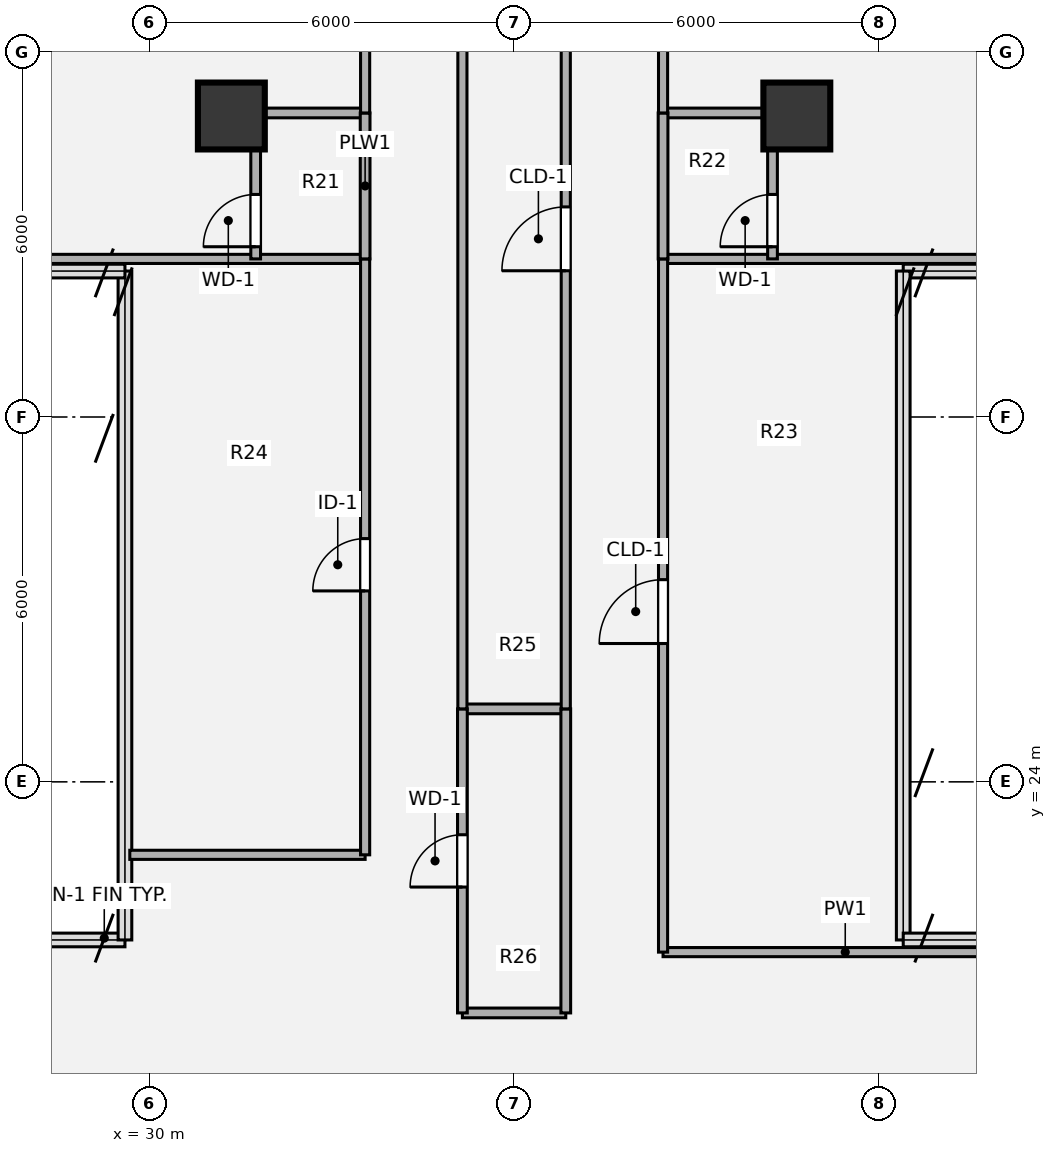
"""IFC4 building model, lengths in metres.
Left out: names, types, materials, properties, quantities, classifications, styles, units other than length and angle.
Written with IfcOpenShell. Run it as: python <this file> out.ifc"""

import sys

from ifc_helpers import new_model, si_unit, direction, frame, frame_2d, origin, origin_2d, place, context, subcontext, project, spatial, rectangle, hollow_circle, extrude, source, transform, mapped, element, fill, save


model = new_model("IFC4")
c1 = context("Model", 3, precision=1e-05, world=origin(), true_north=direction((0.0, 1.0)))
c2 = subcontext(c1, "Body", "Model", "MODEL_VIEW")
j1 = project(units=[si_unit("LENGTHUNIT", "METRE"), si_unit("PLANEANGLEUNIT", "RADIAN")], contexts=[c1])
p1 = place(None, origin())
s1 = spatial("IfcSite", under=j1, at=p1, CompositionType="ELEMENT")
p2 = place(p1, origin())
s2 = spatial("IfcBuilding", under=s1, at=p2, CompositionType="ELEMENT")
p3 = place(p2, frame((0.0, 0.0, 205.56)))
s3 = spatial("IfcBuildingStorey", under=s2, at=p3, CompositionType="ELEMENT", Elevation=205.56)
m1 = source(origin(), c2, "Body", "SweptSolid", [
    extrude(hollow_circle(Radius=0.55, WallThickness=0.04, at=origin_2d()), origin(), (0.0, 0.0, 1.0), 3.78),
])
for number, where, z_axis, x_axis in (
    (1, (31.35, 34.95, 0.0), (0.0, 0.0, 1.0), (1.0, 0.0, 0.0)),
    (2, (40.65, 34.95, 0.0), (0.0, 0.0, 1.0), (1.0, 0.0, 0.0)),
):
    element("IfcColumn", number, at=place(p3, frame(where, z_axis=z_axis, x_axis=x_axis)), inside=s3, PredefinedType="COLUMN", context=c2, shape_type="MappedRepresentation", body=[
        mapped(m1, transform((0.0, 0.0, 0.0), x_axis=(1.0, 0.0, 0.0), y_axis=(0.0, 1.0, 0.0), z_axis=(0.0, 0.0, 1.0), scale=1.0)),
    ])
p4 = place(p3, frame((35.15, 20.2, 0.0), z_axis=(0.0, 0.0, 1.0), x_axis=(1.0, 0.0, 0.0)))
e3 = element("IfcWall", 3, at=p4, inside=s3, PredefinedType="PLUMBINGWALL", context=c2, shape_type="SweptSolid", body=[
    extrude(rectangle(XDim=1.7, YDim=0.16, at=frame_2d((0.85, 0.0))), origin(), (0.0, 0.0, 1.0), 3.5),
])
p5 = place(p3, frame((38.45, 21.2, 0.0), z_axis=(0.0, 0.0, 1.0), x_axis=(1.0, 0.0, 0.0)))
e4 = element("IfcWall", 4, at=p5, inside=s3, PredefinedType="PARTITIONING", context=c2, shape_type="SweptSolid", body=[
    extrude(rectangle(XDim=5.993, YDim=0.15, at=frame_2d((2.996, 0.0))), origin(), (0.0, 0.0, 1.0), 3.5),
])
p6 = place(p3, frame((29.68, 22.8, 0.0), z_axis=(0.0, 0.0, 1.0), x_axis=(1.0, 0.0, 0.0)))
e5 = element("IfcWall", 5, at=p6, inside=s3, PredefinedType="PARTITIONING", context=c2, shape_type="SweptSolid", body=[
    extrude(rectangle(XDim=3.87, YDim=0.15, at=frame_2d((1.935, 0.0))), origin(), (0.0, 0.0, 1.0), 3.5),
])
p7 = place(p3, frame((35.15, 25.2, 0.0), z_axis=(0.0, 0.0, 1.0), x_axis=(1.0, 0.0, 0.0)))
e6 = element("IfcWall", 6, at=p7, inside=s3, PredefinedType="PLUMBINGWALL", context=c2, shape_type="SweptSolid", body=[
    extrude(rectangle(XDim=1.7, YDim=0.16, at=frame_2d((0.85, 0.0))), origin(), (0.0, 0.0, 1.0), 3.5),
])
p8 = place(p3, frame((27.557, 32.6, 0.0), z_axis=(0.0, 0.0, 1.0), x_axis=(1.0, 0.0, 0.0)))
e7 = element("IfcWall", 7, at=p8, inside=s3, PredefinedType="PARTITIONING", context=c2, shape_type="SweptSolid", body=[
    extrude(rectangle(XDim=5.993, YDim=0.15, at=frame_2d((2.997, 0.0))), origin(), (0.0, 0.0, 1.0), 3.5),
])
p9 = place(p3, frame((38.45, 32.6, 0.0), z_axis=(0.0, 0.0, 1.0), x_axis=(1.0, 0.0, 0.0)))
e8 = element("IfcWall", 8, at=p9, inside=s3, PredefinedType="PARTITIONING", context=c2, shape_type="SweptSolid", body=[
    extrude(rectangle(XDim=5.993, YDim=0.15, at=frame_2d((2.997, 0.0))), origin(), (0.0, 0.0, 1.0), 3.5),
])
for number, where, z_axis, x_axis in (
    (9, (31.75, 35.0, 0.0), (0.0, 0.0, 1.0), (1.0, 0.0, 0.0)),
    (10, (38.45, 35.0, 0.0), (0.0, 0.0, 1.0), (1.0, 0.0, 0.0)),
):
    element("IfcWall", number, at=place(p3, frame(where, z_axis=z_axis, x_axis=x_axis)), inside=s3, PredefinedType="PLUMBINGWALL", context=c2, shape_type="SweptSolid", body=[
        extrude(rectangle(XDim=1.8, YDim=0.16, at=frame_2d((0.9, 0.0))), origin(), (0.0, 0.0, 1.0), 2.903),
    ])
p10 = place(p3, frame((31.75, 32.6, 0.0), z_axis=(0.0, 0.0, 1.0), x_axis=(0.0, 1.0, 0.0)))
e11 = element("IfcWall", 11, at=p10, inside=s3, PredefinedType="PLUMBINGWALL", context=c2, shape_type="SweptSolid", body=[
    extrude(rectangle(XDim=2.4, YDim=0.16, at=frame_2d((1.2, 0.0))), origin(), (0.0, 0.0, 1.0), 3.5),
])
p11 = place(p10, frame((0.2, 0.0, 0.0)))
e12 = element("IfcOpeningElement", 12, at=p11, cuts=e11, PredefinedType="OPENING", context=c2, shape_type="SweptSolid", body=[
    extrude(rectangle(XDim=0.86, YDim=2.1, at=origin_2d()), frame((0.43, 0.09, 1.05), z_axis=(0.0, -1.0, 0.0), x_axis=(1.0, 0.0, 0.0)), (0.0, 0.0, 1.0), 0.18),
])
p12 = place(p3, frame((33.55, 22.8, 0.0), z_axis=(0.0, 0.0, 1.0), x_axis=(0.0, 1.0, 0.0)))
e13 = element("IfcWall", 13, at=p12, inside=s3, PredefinedType="PARTITIONING", context=c2, shape_type="SweptSolid", body=[
    extrude(rectangle(XDim=9.8, YDim=0.15, at=frame_2d((4.9, 0.0))), origin(), (0.0, 0.0, 1.0), 3.5),
])
p13 = place(p12, frame((4.34, 0.0, 0.0)))
e14 = element("IfcOpeningElement", 14, at=p13, cuts=e13, PredefinedType="OPENING", context=c2, shape_type="SweptSolid", body=[
    extrude(rectangle(XDim=0.86, YDim=2.1, at=origin_2d()), frame((0.43, 0.085, 1.05), z_axis=(0.0, -1.0, 0.0), x_axis=(1.0, 0.0, 0.0)), (0.0, 0.0, 1.0), 0.17),
])
p14 = place(p3, frame((33.55, 32.6, 0.0), z_axis=(0.0, 0.0, 1.0), x_axis=(0.0, 1.0, 0.0)))
e15 = element("IfcWall", 15, at=p14, inside=s3, PredefinedType="PLUMBINGWALL", context=c2, shape_type="SweptSolid", body=[
    extrude(rectangle(XDim=2.4, YDim=0.16, at=frame_2d((1.2, 0.0))), origin(), (0.0, 0.0, 1.0), 3.5),
])
p15 = place(p3, frame((33.55, 35.0, 0.0), z_axis=(0.0, 0.0, 1.0), x_axis=(0.0, 1.0, 0.0)))
e16 = element("IfcWall", 16, at=p15, inside=s3, PredefinedType="PARTITIONING", context=c2, shape_type="SweptSolid", body=[
    extrude(rectangle(XDim=3.526, YDim=0.15, at=frame_2d((1.763, 0.0))), origin(), (0.0, 0.0, 1.0), 3.5),
])
p16 = place(p15, frame((1.303, 0.0, 0.0)))
e17 = element("IfcOpeningElement", 17, at=p16, cuts=e16, PredefinedType="OPENING", context=c2, shape_type="SweptSolid", body=[
    extrude(rectangle(XDim=0.92, YDim=2.1, at=origin_2d()), frame((0.46, 0.085, 1.05), z_axis=(0.0, -1.0, 0.0), x_axis=(1.0, 0.0, 0.0)), (0.0, 0.0, 1.0), 0.17),
])
p17 = place(p3, frame((35.15, 20.2, 0.0), z_axis=(0.0, 0.0, 1.0), x_axis=(0.0, 1.0, 0.0)))
e18 = element("IfcWall", 18, at=p17, inside=s3, PredefinedType="PLUMBINGWALL", context=c2, shape_type="SweptSolid", body=[
    extrude(rectangle(XDim=5.0, YDim=0.16, at=frame_2d((2.5, 0.0))), origin(), (0.0, 0.0, 1.0), 3.5),
])
p18 = place(p17, frame((2.07, 0.0, 0.0)))
e19 = element("IfcOpeningElement", 19, at=p18, cuts=e18, PredefinedType="OPENING", context=c2, shape_type="SweptSolid", body=[
    extrude(rectangle(XDim=0.86, YDim=2.1, at=origin_2d()), frame((0.43, 0.09, 1.05), z_axis=(0.0, -1.0, 0.0), x_axis=(1.0, 0.0, 0.0)), (0.0, 0.0, 1.0), 0.18),
])
p19 = place(p3, frame((35.15, 25.2, 0.0), z_axis=(0.0, 0.0, 1.0), x_axis=(0.0, 1.0, 0.0)))
e20 = element("IfcWall", 20, at=p19, inside=s3, PredefinedType="PARTITIONING", context=c2, shape_type="SweptSolid", body=[
    extrude(rectangle(XDim=15.46, YDim=0.15, at=frame_2d((7.73, 0.0))), origin(), (0.0, 0.0, 1.0), 3.5),
])
p20 = place(p3, frame((36.85, 20.2, 0.0), z_axis=(0.0, 0.0, 1.0), x_axis=(0.0, 1.0, 0.0)))
e21 = element("IfcWall", 21, at=p20, inside=s3, PredefinedType="PLUMBINGWALL", context=c2, shape_type="SweptSolid", body=[
    extrude(rectangle(XDim=5.0, YDim=0.16, at=frame_2d((2.5, 0.0))), origin(), (0.0, 0.0, 1.0), 3.5),
])
p21 = place(p3, frame((36.85, 25.2, 0.0), z_axis=(0.0, 0.0, 1.0), x_axis=(0.0, 1.0, 0.0)))
e22 = element("IfcWall", 22, at=p21, inside=s3, PredefinedType="PARTITIONING", context=c2, shape_type="SweptSolid", body=[
    extrude(rectangle(XDim=15.46, YDim=0.15, at=frame_2d((7.73, 0.0))), origin(), (0.0, 0.0, 1.0), 3.5),
])
p22 = place(p21, frame((7.205, 0.0, 0.0)))
e23 = element("IfcOpeningElement", 23, at=p22, cuts=e22, PredefinedType="OPENING", context=c2, shape_type="SweptSolid", body=[
    extrude(rectangle(XDim=1.05, YDim=2.1, at=origin_2d()), frame((0.525, 0.085, 1.05), z_axis=(0.0, -1.0, 0.0), x_axis=(1.0, 0.0, 0.0)), (0.0, 0.0, 1.0), 0.17),
])
p23 = place(p3, frame((38.45, 21.2, 0.0), z_axis=(0.0, 0.0, 1.0), x_axis=(0.0, 1.0, 0.0)))
e24 = element("IfcWall", 24, at=p23, inside=s3, PredefinedType="PARTITIONING", context=c2, shape_type="SweptSolid", body=[
    extrude(rectangle(XDim=11.4, YDim=0.15, at=frame_2d((5.7, 0.0))), origin(), (0.0, 0.0, 1.0), 3.5),
])
p24 = place(p23, frame((5.075, 0.0, 0.0)))
e25 = element("IfcOpeningElement", 25, at=p24, cuts=e24, PredefinedType="OPENING", context=c2, shape_type="SweptSolid", body=[
    extrude(rectangle(XDim=1.05, YDim=2.1, at=origin_2d()), frame((0.525, 0.085, 1.05), z_axis=(0.0, -1.0, 0.0), x_axis=(1.0, 0.0, 0.0)), (0.0, 0.0, 1.0), 0.17),
])
p25 = place(p3, frame((38.45, 32.6, 0.0), z_axis=(0.0, 0.0, 1.0), x_axis=(0.0, 1.0, 0.0)))
e26 = element("IfcWall", 26, at=p25, inside=s3, PredefinedType="PLUMBINGWALL", context=c2, shape_type="SweptSolid", body=[
    extrude(rectangle(XDim=2.4, YDim=0.16, at=frame_2d((1.2, 0.0))), origin(), (0.0, 0.0, 1.0), 3.5),
])
p26 = place(p3, frame((38.45, 35.0, 0.0), z_axis=(0.0, 0.0, 1.0), x_axis=(0.0, 1.0, 0.0)))
e27 = element("IfcWall", 27, at=p26, inside=s3, PredefinedType="PARTITIONING", context=c2, shape_type="SweptSolid", body=[
    extrude(rectangle(XDim=3.526, YDim=0.15, at=frame_2d((1.763, 0.0))), origin(), (0.0, 0.0, 1.0), 3.5),
])
p27 = place(p26, frame((1.303, 0.0, 0.0)))
e28 = element("IfcOpeningElement", 28, at=p27, cuts=e27, PredefinedType="OPENING", context=c2, shape_type="SweptSolid", body=[
    extrude(rectangle(XDim=0.92, YDim=2.1, at=origin_2d()), frame((0.46, 0.085, 1.05), z_axis=(0.0, -1.0, 0.0), x_axis=(1.0, 0.0, 0.0)), (0.0, 0.0, 1.0), 0.17),
])
p28 = place(p3, frame((40.25, 32.6, 0.0), z_axis=(0.0, 0.0, 1.0), x_axis=(0.0, 1.0, 0.0)))
e29 = element("IfcWall", 29, at=p28, inside=s3, PredefinedType="PLUMBINGWALL", context=c2, shape_type="SweptSolid", body=[
    extrude(rectangle(XDim=2.4, YDim=0.16, at=frame_2d((1.2, 0.0))), origin(), (0.0, 0.0, 1.0), 3.5),
])
p29 = place(p28, frame((0.2, 0.0, 0.0)))
e30 = element("IfcOpeningElement", 30, at=p29, cuts=e29, PredefinedType="OPENING", context=c2, shape_type="SweptSolid", body=[
    extrude(rectangle(XDim=0.86, YDim=2.1, at=origin_2d()), frame((0.43, 0.09, 1.05), z_axis=(0.0, -1.0, 0.0), x_axis=(1.0, 0.0, 0.0)), (0.0, 0.0, 1.0), 0.18),
])
m2 = source(origin(), c2, "Body", "SweptSolid", [
    extrude(rectangle(XDim=0.86, YDim=2.1, at=origin_2d()), frame((0.43, 0.025, 1.05), z_axis=(0.0, -1.0, 0.0), x_axis=(1.0, 0.0, 0.0)), (0.0, 0.0, 1.0), 0.05),
])
p30 = place(p11, origin())
e31 = element("IfcDoor", 31, at=p30, inside=s3, OperationType="SINGLE_SWING_LEFT", PredefinedType="DOOR", context=c2, shape_type="MappedRepresentation", body=[
    mapped(m2, transform((0.0, 0.0, 0.0), x_axis=(1.0, 0.0, 0.0), y_axis=(0.0, 1.0, 0.0), z_axis=(0.0, 0.0, 1.0), scale=1.0)),
])
fill(e12, e31)
m3 = source(origin(), c2, "Body", "SweptSolid", [
    extrude(rectangle(XDim=0.86, YDim=2.1, at=origin_2d()), frame((0.43, 0.025, 1.05), z_axis=(0.0, -1.0, 0.0), x_axis=(1.0, 0.0, 0.0)), (0.0, 0.0, 1.0), 0.05),
])
p31 = place(p13, origin())
e32 = element("IfcDoor", 32, at=p31, inside=s3, OperationType="SINGLE_SWING_LEFT", PredefinedType="DOOR", context=c2, shape_type="MappedRepresentation", body=[
    mapped(m3, transform((0.0, 0.0, 0.0), x_axis=(1.0, 0.0, 0.0), y_axis=(0.0, 1.0, 0.0), z_axis=(0.0, 0.0, 1.0), scale=1.0)),
])
fill(e14, e32)
p32 = place(p18, origin())
e33 = element("IfcDoor", 33, at=p32, inside=s3, OperationType="SINGLE_SWING_LEFT", PredefinedType="DOOR", context=c2, shape_type="MappedRepresentation", body=[
    mapped(m2, transform((0.0, 0.0, 0.0), x_axis=(1.0, 0.0, 0.0), y_axis=(0.0, 1.0, 0.0), z_axis=(0.0, 0.0, 1.0), scale=1.0)),
])
fill(e19, e33)
m4 = source(origin(), c2, "Body", "SweptSolid", [
    extrude(rectangle(XDim=1.05, YDim=2.1, at=origin_2d()), frame((0.525, 0.025, 1.05), z_axis=(0.0, -1.0, 0.0), x_axis=(1.0, 0.0, 0.0)), (0.0, 0.0, 1.0), 0.05),
])
p33 = place(p22, origin())
e34 = element("IfcDoor", 34, at=p33, inside=s3, OperationType="SINGLE_SWING_LEFT", PredefinedType="DOOR", context=c2, shape_type="MappedRepresentation", body=[
    mapped(m4, transform((0.0, 0.0, 0.0), x_axis=(1.0, 0.0, 0.0), y_axis=(0.0, 1.0, 0.0), z_axis=(0.0, 0.0, 1.0), scale=1.0)),
])
fill(e23, e34)
p34 = place(p24, origin())
e35 = element("IfcDoor", 35, at=p34, inside=s3, OperationType="SINGLE_SWING_LEFT", PredefinedType="DOOR", context=c2, shape_type="MappedRepresentation", body=[
    mapped(m4, transform((0.0, 0.0, 0.0), x_axis=(1.0, 0.0, 0.0), y_axis=(0.0, 1.0, 0.0), z_axis=(0.0, 0.0, 1.0), scale=1.0)),
])
fill(e25, e35)
p35 = place(p29, origin())
e36 = element("IfcDoor", 36, at=p35, inside=s3, OperationType="SINGLE_SWING_LEFT", PredefinedType="DOOR", context=c2, shape_type="MappedRepresentation", body=[
    mapped(m2, transform((0.0, 0.0, 0.0), x_axis=(1.0, 0.0, 0.0), y_axis=(0.0, 1.0, 0.0), z_axis=(0.0, 0.0, 1.0), scale=1.0)),
])
fill(e30, e36)
save(model, sys.argv[1])
